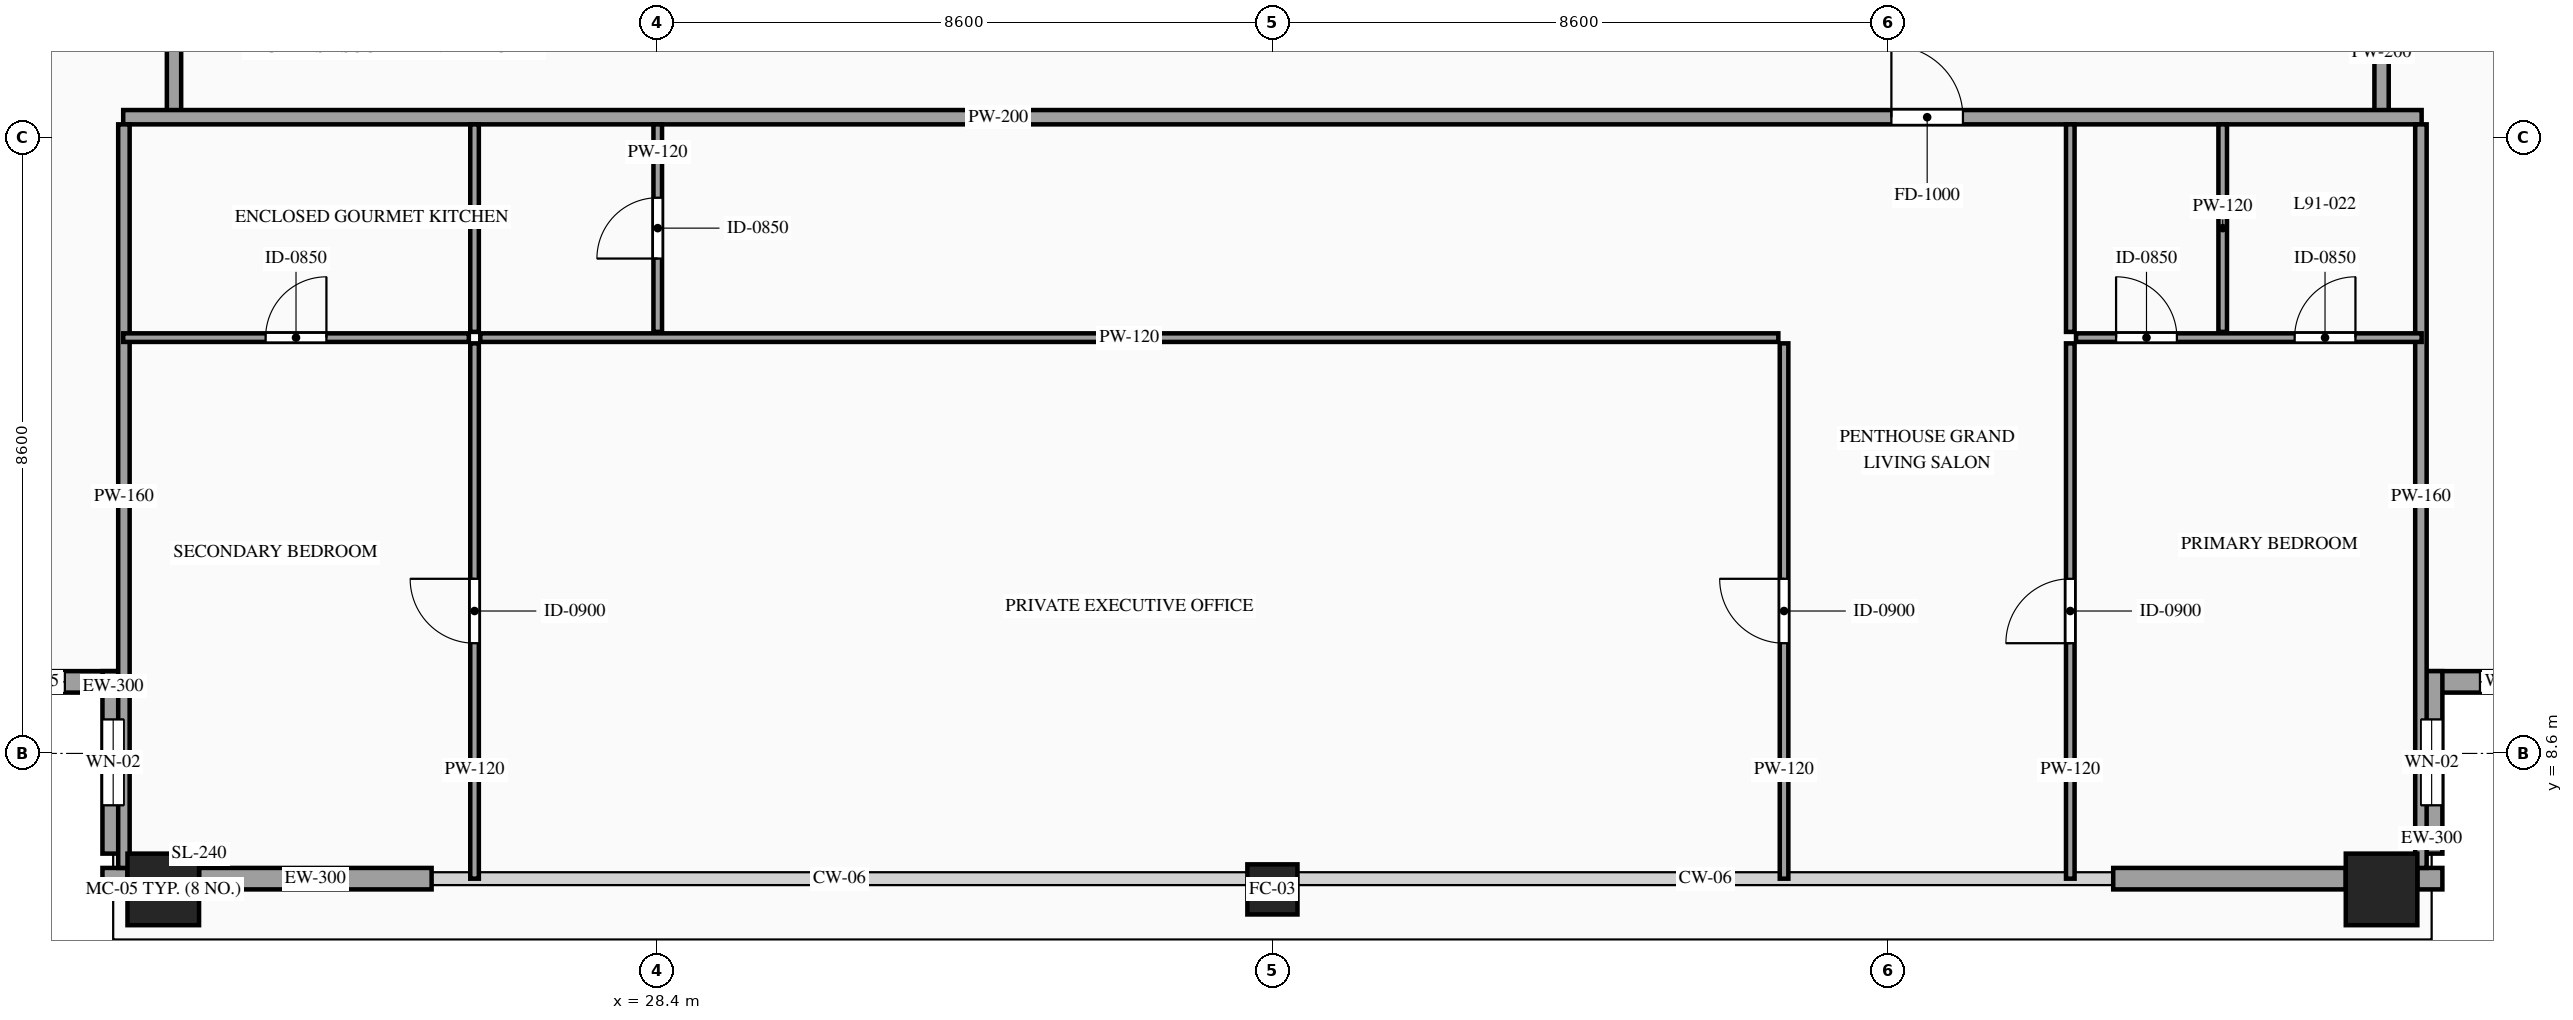
"""IFC4 building model, lengths in metres.
Left out: names, types, materials, properties, quantities, classifications, styles, units other than length and angle.
Written with IfcOpenShell. Run it as: python <this file> out.ifc"""

import sys

from ifc_helpers import new_model, si_unit, direction, frame, frame_2d, origin, origin_2d, place, context, subcontext, project, spatial, rectangle, hollow_rectangle, extrude, source, transform, mapped, element, fill, save


model = new_model("IFC4")
c1 = context("Model", 3, precision=1e-05, world=origin(), true_north=direction((0.0, 1.0)))
c2 = subcontext(c1, "Body", "Model", "MODEL_VIEW")
j1 = project(units=[si_unit("LENGTHUNIT", "METRE"), si_unit("PLANEANGLEUNIT", "RADIAN")], contexts=[c1])
p1 = place(None, origin())
s1 = spatial("IfcSite", under=j1, at=p1, CompositionType="ELEMENT")
p2 = place(p1, origin())
s2 = spatial("IfcBuilding", under=s1, at=p2, CompositionType="ELEMENT")
p3 = place(p2, frame((0.0, 0.0, 339.2)))
s3 = spatial("IfcBuildingStorey", under=s2, at=p3, CompositionType="ELEMENT", Elevation=339.2)
m1 = source(origin(), c2, "Body", "SweptSolid", [
    extrude(hollow_rectangle(XDim=1.0, YDim=1.0, WallThickness=0.048, at=origin_2d()), origin(), (0.0, 0.0, 1.0), 4.0),
])
p4 = place(p3, frame((21.5, 6.7, 0.0), z_axis=(0.0, 0.0, 1.0), x_axis=(1.0, 0.0, 0.0)))
e1 = element("IfcColumn", 1, at=p4, inside=s3, PredefinedType="COLUMN", context=c2, shape_type="MappedRepresentation", body=[
    mapped(m1, transform((0.0, 0.0, 0.0), scale=1.0)),
])
m2 = source(origin(), c2, "Body", "SweptSolid", [
    extrude(hollow_rectangle(XDim=0.7, YDim=0.7, WallThickness=0.032, at=origin_2d()), origin(), (0.0, 0.0, 1.0), 4.0),
])
p5 = place(p3, frame((37.0, 6.7, 0.0), z_axis=(0.0, 0.0, 1.0), x_axis=(1.0, 0.0, 0.0)))
e2 = element("IfcColumn", 2, at=p5, inside=s3, PredefinedType="COLUMN", context=c2, shape_type="MappedRepresentation", body=[
    mapped(m2, transform((0.0, 0.0, 0.0), scale=1.0)),
])
p6 = place(p3, frame((52.5, 6.7, 0.0), z_axis=(0.0, 0.0, 1.0), x_axis=(1.0, 0.0, 0.0)))
e3 = element("IfcColumn", 3, at=p6, inside=s3, PredefinedType="COLUMN", context=c2, shape_type="MappedRepresentation", body=[
    mapped(m1, transform((0.0, 0.0, 0.0), scale=1.0)),
])
p7 = place(p3, frame((18.4, 9.6, 0.0), z_axis=(0.0, 0.0, 1.0), x_axis=(1.0, 0.0, 0.0)))
e4 = element("IfcWall", 4, at=p7, inside=s3, PredefinedType="SOLIDWALL", context=c2, shape_type="SweptSolid", body=[
    extrude(rectangle(XDim=2.55, YDim=0.3, at=frame_2d((1.275, 0.0))), origin(), (0.0, 0.0, 1.0), 3.76),
])
p8 = place(p7, frame((0.825, 0.0, 0.85)))
e5 = element("IfcOpeningElement", 5, at=p8, cuts=e4, PredefinedType="OPENING", context=c2, shape_type="SweptSolid", body=[
    extrude(rectangle(XDim=0.9, YDim=1.5, at=frame_2d((0.45, 0.75))), frame((0.0, 0.165, 0.0), z_axis=(0.0, -1.0, 0.0), x_axis=(1.0, 0.0, 0.0)), (0.0, 0.0, 1.0), 0.33),
])
p9 = place(p3, frame((20.8, 9.75, 0.0), z_axis=(0.0, 0.0, 1.0), x_axis=(0.0, -1.0, 0.0)))
e6 = element("IfcWall", 6, at=p9, inside=s3, PredefinedType="SOLIDWALL", context=c2, shape_type="SweptSolid", body=[
    extrude(rectangle(XDim=2.55, YDim=0.3, at=frame_2d((1.275, 0.0))), origin(), (0.0, 0.0, 1.0), 3.76),
])
p10 = place(p9, frame((0.675, 0.0, 0.85)))
e7 = element("IfcOpeningElement", 7, at=p10, cuts=e6, PredefinedType="OPENING", context=c2, shape_type="SweptSolid", body=[
    extrude(rectangle(XDim=1.2, YDim=2.1, at=frame_2d((0.6, 1.05))), frame((0.0, 0.165, 0.0), z_axis=(0.0, -1.0, 0.0), x_axis=(1.0, 0.0, 0.0)), (0.0, 0.0, 1.0), 0.33),
])
p11 = place(p3, frame((53.05, 9.6, 0.0), z_axis=(0.0, 0.0, 1.0), x_axis=(1.0, 0.0, 0.0)))
e8 = element("IfcWall", 8, at=p11, inside=s3, PredefinedType="SOLIDWALL", context=c2, shape_type="SweptSolid", body=[
    extrude(rectangle(XDim=2.55, YDim=0.3, at=frame_2d((1.275, 0.0))), origin(), (0.0, 0.0, 1.0), 3.76),
])
p12 = place(p11, frame((0.825, 0.0, 0.85)))
e9 = element("IfcOpeningElement", 9, at=p12, cuts=e8, PredefinedType="OPENING", context=c2, shape_type="SweptSolid", body=[
    extrude(rectangle(XDim=0.9, YDim=1.5, at=frame_2d((0.45, 0.75))), frame((0.0, 0.165, 0.0), z_axis=(0.0, -1.0, 0.0), x_axis=(1.0, 0.0, 0.0)), (0.0, 0.0, 1.0), 0.33),
])
p13 = place(p3, frame((53.2, 7.2, 0.0), z_axis=(0.0, 0.0, 1.0), x_axis=(0.0, 1.0, 0.0)))
e10 = element("IfcWall", 10, at=p13, inside=s3, PredefinedType="SOLIDWALL", context=c2, shape_type="SweptSolid", body=[
    extrude(rectangle(XDim=2.55, YDim=0.3, at=frame_2d((1.275, 0.0))), origin(), (0.0, 0.0, 1.0), 3.76),
])
p14 = place(p13, frame((0.675, 0.0, 0.85)))
e11 = element("IfcOpeningElement", 11, at=p14, cuts=e10, PredefinedType="OPENING", context=c2, shape_type="SweptSolid", body=[
    extrude(rectangle(XDim=1.2, YDim=2.1, at=frame_2d((0.6, 1.05))), frame((0.0, 0.165, 0.0), z_axis=(0.0, -1.0, 0.0), x_axis=(1.0, 0.0, 0.0)), (0.0, 0.0, 1.0), 0.33),
])
m3 = source(origin(), c2, "Body", "SweptSolid", [
    extrude(rectangle(XDim=0.35, YDim=0.3, at=frame_2d((0.175, 0.0))), origin(), (0.0, 0.0, 1.0), 3.76),
])
for number, where, z_axis, x_axis in (
    (12, (20.65, 6.85, 0.0), (0.0, 0.0, 1.0), (1.0, 0.0, 0.0)),
    (13, (53.0, 6.85, 0.0), (0.0, 0.0, 1.0), (1.0, 0.0, 0.0)),
):
    element("IfcWall", number, at=place(p3, frame(where, z_axis=z_axis, x_axis=x_axis)), inside=s3, PredefinedType="SOLIDWALL", context=c2, shape_type="MappedRepresentation", body=[
        mapped(m3, transform((0.0, 0.0, 0.0), scale=1.0)),
    ])
m4 = source(origin(), c2, "Body", "SweptSolid", [
    extrude(rectangle(XDim=3.25, YDim=0.3, at=frame_2d((1.625, 0.0))), origin(), (0.0, 0.0, 1.0), 3.365),
])
for number, where, z_axis, x_axis in (
    (14, (22.0, 6.85, 0.0), (0.0, 0.0, 1.0), (1.0, 0.0, 0.0)),
    (15, (48.75, 6.85, 0.0), (0.0, 0.0, 1.0), (1.0, 0.0, 0.0)),
):
    element("IfcWall", number, at=place(p3, frame(where, z_axis=z_axis, x_axis=x_axis)), inside=s3, PredefinedType="SOLIDWALL", context=c2, shape_type="MappedRepresentation", body=[
        mapped(m4, transform((0.0, 0.0, 0.0), scale=1.0)),
    ])
m5 = source(origin(), c2, "Body", "SweptSolid", [
    extrude(rectangle(XDim=1.7, YDim=0.2, at=frame_2d((0.85, 0.0))), origin(), (0.0, 0.0, 1.0), 3.76),
])
for number, where, z_axis, x_axis in (
    (16, (21.65, 17.55, 0.0), (0.0, 0.0, 1.0), (0.0, 1.0, 0.0)),
    (17, (52.5, 17.55, 0.0), (0.0, 0.0, 1.0), (0.0, 1.0, 0.0)),
):
    element("IfcWall", number, at=place(p3, frame(where, z_axis=z_axis, x_axis=x_axis)), inside=s3, PredefinedType="PARTITIONING", context=c2, shape_type="MappedRepresentation", body=[
        mapped(m5, transform((0.0, 0.0, 0.0), scale=1.0)),
    ])
p15 = place(p3, frame((20.94, 17.49, 0.0), z_axis=(0.0, 0.0, 1.0), x_axis=(1.0, 0.0, 0.0)))
e18 = element("IfcWall", 18, at=p15, inside=s3, PredefinedType="PARTITIONING", context=c2, shape_type="SweptSolid", body=[
    extrude(rectangle(XDim=32.12, YDim=0.2, at=frame_2d((16.06, 0.0))), origin(), (0.0, 0.0, 1.0), 3.76),
])
p16 = place(p15, frame((24.71, 0.0, 0.0)))
e19 = element("IfcOpeningElement", 19, at=p16, cuts=e18, PredefinedType="OPENING", context=c2, shape_type="SweptSolid", body=[
    extrude(rectangle(XDim=1.0, YDim=2.2, at=frame_2d((0.5, 1.1))), frame((0.0, 0.115, 0.0), z_axis=(0.0, -1.0, 0.0), x_axis=(1.0, 0.0, 0.0)), (0.0, 0.0, 1.0), 0.23),
])
m6 = source(origin(), c2, "Body", "SweptSolid", [
    extrude(rectangle(XDim=10.39, YDim=0.16, at=frame_2d((5.195, 0.0))), origin(), (0.0, 0.0, 1.0), 3.76),
])
for number, where, z_axis, x_axis in (
    (20, (20.95, 7.0, 0.0), (0.0, 0.0, 1.0), (0.0, 1.0, 0.0)),
    (21, (53.05, 7.0, 0.0), (0.0, 0.0, 1.0), (0.0, 1.0, 0.0)),
):
    element("IfcWall", number, at=place(p3, frame(where, z_axis=z_axis, x_axis=x_axis)), inside=s3, PredefinedType="PARTITIONING", context=c2, shape_type="MappedRepresentation", body=[
        mapped(m6, transform((0.0, 0.0, 0.0), scale=1.0)),
    ])
p17 = place(p3, frame((20.94, 14.41, 0.0), z_axis=(0.0, 0.0, 1.0), x_axis=(1.0, 0.0, 0.0)))
e22 = element("IfcWall", 22, at=p17, inside=s3, PredefinedType="PARTITIONING", context=c2, shape_type="SweptSolid", body=[
    extrude(rectangle(XDim=4.83, YDim=0.12, at=frame_2d((2.415, 0.0))), origin(), (0.0, 0.0, 1.0), 3.76),
])
p18 = place(p17, frame((1.99, 0.0, 0.0)))
e23 = element("IfcOpeningElement", 23, at=p18, cuts=e22, PredefinedType="OPENING", context=c2, shape_type="SweptSolid", body=[
    extrude(rectangle(XDim=0.85, YDim=2.1, at=frame_2d((0.425, 1.05))), frame((0.0, 0.075, 0.0), z_axis=(0.0, -1.0, 0.0), x_axis=(1.0, 0.0, 0.0)), (0.0, 0.0, 1.0), 0.15),
])
m7 = source(origin(), c2, "Body", "SweptSolid", [
    extrude(rectangle(XDim=2.9, YDim=0.12, at=frame_2d((1.45, 0.0))), origin(), (0.0, 0.0, 1.0), 3.76),
])
p19 = place(p3, frame((25.85, 14.49, 0.0), z_axis=(0.0, 0.0, 1.0), x_axis=(0.0, 1.0, 0.0)))
e24 = element("IfcWall", 24, at=p19, inside=s3, PredefinedType="PARTITIONING", context=c2, shape_type="MappedRepresentation", body=[
    mapped(m7, transform((0.0, 0.0, 0.0), scale=1.0)),
])
p20 = place(p3, frame((28.41, 14.49, 0.0), z_axis=(0.0, 0.0, 1.0), x_axis=(0.0, 1.0, 0.0)))
e25 = element("IfcWall", 25, at=p20, inside=s3, PredefinedType="PARTITIONING", context=c2, shape_type="SweptSolid", body=[
    extrude(rectangle(XDim=2.9, YDim=0.12, at=frame_2d((1.45, 0.0))), origin(), (0.0, 0.0, 1.0), 3.76),
])
p21 = place(p20, frame((1.025, 0.0, 0.0)))
e26 = element("IfcOpeningElement", 26, at=p21, cuts=e25, PredefinedType="OPENING", context=c2, shape_type="SweptSolid", body=[
    extrude(rectangle(XDim=0.85, YDim=2.1, at=frame_2d((0.425, 1.05))), frame((0.0, 0.075, 0.0), z_axis=(0.0, -1.0, 0.0), x_axis=(1.0, 0.0, 0.0)), (0.0, 0.0, 1.0), 0.15),
])
m8 = source(origin(), c2, "Body", "SweptSolid", [
    extrude(rectangle(XDim=2.9, YDim=0.12, at=frame_2d((1.45, 0.0))), origin(), (0.0, 0.0, 1.0), 3.305),
])
p22 = place(p3, frame((50.28, 14.49, 0.0), z_axis=(0.0, 0.0, 1.0), x_axis=(0.0, 1.0, 0.0)))
e27 = element("IfcWall", 27, at=p22, inside=s3, PredefinedType="PARTITIONING", context=c2, shape_type="MappedRepresentation", body=[
    mapped(m8, transform((0.0, 0.0, 0.0), scale=1.0)),
])
p23 = place(p3, frame((48.15, 14.49, 0.0), z_axis=(0.0, 0.0, 1.0), x_axis=(0.0, 1.0, 0.0)))
e28 = element("IfcWall", 28, at=p23, inside=s3, PredefinedType="PARTITIONING", context=c2, shape_type="MappedRepresentation", body=[
    mapped(m7, transform((0.0, 0.0, 0.0), scale=1.0)),
])
p24 = place(p3, frame((25.85, 6.85, 0.0), z_axis=(0.0, 0.0, 1.0), x_axis=(0.0, 1.0, 0.0)))
e29 = element("IfcWall", 29, at=p24, inside=s3, PredefinedType="PARTITIONING", context=c2, shape_type="SweptSolid", body=[
    extrude(rectangle(XDim=7.48, YDim=0.12, at=frame_2d((3.74, 0.0))), origin(), (0.0, 0.0, 1.0), 3.76),
])
p25 = place(p24, frame((3.29, 0.0, 0.0)))
e30 = element("IfcOpeningElement", 30, at=p25, cuts=e29, PredefinedType="OPENING", context=c2, shape_type="SweptSolid", body=[
    extrude(rectangle(XDim=0.9, YDim=2.15, at=frame_2d((0.45, 1.075))), frame((0.0, 0.075, 0.0), z_axis=(0.0, -1.0, 0.0), x_axis=(1.0, 0.0, 0.0)), (0.0, 0.0, 1.0), 0.15),
])
p26 = place(p3, frame((48.23, 14.41, 0.0), z_axis=(0.0, 0.0, 1.0), x_axis=(1.0, 0.0, 0.0)))
e31 = element("IfcWall", 31, at=p26, inside=s3, PredefinedType="PARTITIONING", context=c2, shape_type="SweptSolid", body=[
    extrude(rectangle(XDim=4.83, YDim=0.12, at=frame_2d((2.415, 0.0))), origin(), (0.0, 0.0, 1.0), 3.76),
])
p27 = place(p26, frame((3.055, 0.0, 0.0)))
e32 = element("IfcOpeningElement", 32, at=p27, cuts=e31, PredefinedType="OPENING", context=c2, shape_type="SweptSolid", body=[
    extrude(rectangle(XDim=0.85, YDim=2.1, at=frame_2d((0.425, 1.05))), frame((0.0, 0.075, 0.0), z_axis=(0.0, -1.0, 0.0), x_axis=(1.0, 0.0, 0.0)), (0.0, 0.0, 1.0), 0.15),
])
p28 = place(p26, frame((0.56, 0.0, 0.0)))
e33 = element("IfcOpeningElement", 33, at=p28, cuts=e31, PredefinedType="OPENING", context=c2, shape_type="SweptSolid", body=[
    extrude(rectangle(XDim=0.85, YDim=2.1, at=frame_2d((0.425, 1.05))), frame((0.0, 0.075, 0.0), z_axis=(0.0, -1.0, 0.0), x_axis=(1.0, 0.0, 0.0)), (0.0, 0.0, 1.0), 0.15),
])
p29 = place(p3, frame((48.15, 6.85, 0.0), z_axis=(0.0, 0.0, 1.0), x_axis=(0.0, 1.0, 0.0)))
e34 = element("IfcWall", 34, at=p29, inside=s3, PredefinedType="PARTITIONING", context=c2, shape_type="SweptSolid", body=[
    extrude(rectangle(XDim=7.48, YDim=0.12, at=frame_2d((3.74, 0.0))), origin(), (0.0, 0.0, 1.0), 3.76),
])
p30 = place(p29, frame((3.29, 0.0, 0.0)))
e35 = element("IfcOpeningElement", 35, at=p30, cuts=e34, PredefinedType="OPENING", context=c2, shape_type="SweptSolid", body=[
    extrude(rectangle(XDim=0.9, YDim=2.15, at=frame_2d((0.45, 1.075))), frame((0.0, 0.075, 0.0), z_axis=(0.0, -1.0, 0.0), x_axis=(1.0, 0.0, 0.0)), (0.0, 0.0, 1.0), 0.15),
])
m9 = source(origin(), c2, "Body", "SweptSolid", [
    extrude(rectangle(XDim=18.14, YDim=0.12, at=frame_2d((9.07, 0.0))), origin(), (0.0, 0.0, 1.0), 3.76),
])
p31 = place(p3, frame((25.93, 14.41, 0.0), z_axis=(0.0, 0.0, 1.0), x_axis=(1.0, 0.0, 0.0)))
e36 = element("IfcWall", 36, at=p31, inside=s3, PredefinedType="PARTITIONING", context=c2, shape_type="MappedRepresentation", body=[
    mapped(m9, transform((0.0, 0.0, 0.0), scale=1.0)),
])
p32 = place(p3, frame((44.15, 6.85, 0.0), z_axis=(0.0, 0.0, 1.0), x_axis=(0.0, 1.0, 0.0)))
e37 = element("IfcWall", 37, at=p32, inside=s3, PredefinedType="PARTITIONING", context=c2, shape_type="SweptSolid", body=[
    extrude(rectangle(XDim=7.48, YDim=0.12, at=frame_2d((3.74, 0.0))), origin(), (0.0, 0.0, 1.0), 3.76),
])
p33 = place(p32, frame((3.29, 0.0, 0.0)))
e38 = element("IfcOpeningElement", 38, at=p33, cuts=e37, PredefinedType="OPENING", context=c2, shape_type="SweptSolid", body=[
    extrude(rectangle(XDim=0.9, YDim=2.15, at=frame_2d((0.45, 1.075))), frame((0.0, 0.075, 0.0), z_axis=(0.0, -1.0, 0.0), x_axis=(1.0, 0.0, 0.0)), (0.0, 0.0, 1.0), 0.15),
])
m10 = source(origin(), c2, "Body", "SweptSolid", [
    extrude(rectangle(XDim=0.9, YDim=1.5, at=frame_2d((0.45, 0.75))), frame((0.0, 0.03, 0.0), z_axis=(0.0, -1.0, 0.0), x_axis=(1.0, 0.0, 0.0)), (0.0, 0.0, 1.0), 0.06),
])
p34 = place(p8, origin())
e39 = element("IfcWindow", 39, at=p34, inside=s3, PartitioningType="SINGLE_PANEL", PredefinedType="WINDOW", context=c2, shape_type="MappedRepresentation", body=[
    mapped(m10, transform((0.0, 0.0, 0.0), scale=1.0)),
])
fill(e5, e39)
m11 = source(origin(), c2, "Body", "SweptSolid", [
    extrude(rectangle(XDim=1.2, YDim=2.1, at=frame_2d((0.6, 1.05))), frame((0.0, 0.03, 0.0), z_axis=(0.0, -1.0, 0.0), x_axis=(1.0, 0.0, 0.0)), (0.0, 0.0, 1.0), 0.06),
])
p35 = place(p10, origin())
e40 = element("IfcWindow", 40, at=p35, inside=s3, PartitioningType="SINGLE_PANEL", PredefinedType="WINDOW", context=c2, shape_type="MappedRepresentation", body=[
    mapped(m11, transform((0.0, 0.0, 0.0), scale=1.0)),
])
fill(e7, e40)
p36 = place(p12, origin())
e41 = element("IfcWindow", 41, at=p36, inside=s3, PartitioningType="SINGLE_PANEL", PredefinedType="WINDOW", context=c2, shape_type="MappedRepresentation", body=[
    mapped(m10, transform((0.0, 0.0, 0.0), scale=1.0)),
])
fill(e9, e41)
p37 = place(p14, origin())
e42 = element("IfcWindow", 42, at=p37, inside=s3, PartitioningType="SINGLE_PANEL", PredefinedType="WINDOW", context=c2, shape_type="MappedRepresentation", body=[
    mapped(m11, transform((0.0, 0.0, 0.0), scale=1.0)),
])
fill(e11, e42)
m12 = source(origin(), c2, "Body", "SweptSolid", [
    extrude(rectangle(XDim=1.0, YDim=2.2, at=frame_2d((0.5, 1.1))), frame((0.0, 0.025, 0.0), z_axis=(0.0, -1.0, 0.0), x_axis=(1.0, 0.0, 0.0)), (0.0, 0.0, 1.0), 0.05),
])
p38 = place(p16, origin())
e43 = element("IfcDoor", 43, at=p38, inside=s3, OperationType="SINGLE_SWING_LEFT", PredefinedType="DOOR", context=c2, shape_type="MappedRepresentation", body=[
    mapped(m12, transform((0.0, 0.0, 0.0), scale=1.0)),
])
fill(e19, e43)
m13 = source(origin(), c2, "Body", "SweptSolid", [
    extrude(rectangle(XDim=0.85, YDim=2.1, at=frame_2d((0.425, 1.05))), frame((0.0, 0.025, 0.0), z_axis=(0.0, -1.0, 0.0), x_axis=(1.0, 0.0, 0.0)), (0.0, 0.0, 1.0), 0.05),
])
p39 = place(p18, origin())
e44 = element("IfcDoor", 44, at=p39, inside=s3, OperationType="SINGLE_SWING_RIGHT", PredefinedType="DOOR", context=c2, shape_type="MappedRepresentation", body=[
    mapped(m13, transform((0.0, 0.0, 0.0), scale=1.0)),
])
fill(e23, e44)
p40 = place(p21, origin())
e45 = element("IfcDoor", 45, at=p40, inside=s3, OperationType="SINGLE_SWING_LEFT", PredefinedType="DOOR", context=c2, shape_type="MappedRepresentation", body=[
    mapped(m13, transform((0.0, 0.0, 0.0), scale=1.0)),
])
fill(e26, e45)
p41 = place(p27, origin())
e46 = element("IfcDoor", 46, at=p41, inside=s3, OperationType="SINGLE_SWING_RIGHT", PredefinedType="DOOR", context=c2, shape_type="MappedRepresentation", body=[
    mapped(m13, transform((0.0, 0.0, 0.0), scale=1.0)),
])
fill(e32, e46)
p42 = place(p28, origin())
e47 = element("IfcDoor", 47, at=p42, inside=s3, OperationType="SINGLE_SWING_LEFT", PredefinedType="DOOR", context=c2, shape_type="MappedRepresentation", body=[
    mapped(m13, transform((0.0, 0.0, 0.0), scale=1.0)),
])
fill(e33, e47)
m14 = source(origin(), c2, "Body", "SweptSolid", [
    extrude(rectangle(XDim=0.9, YDim=2.15, at=frame_2d((0.45, 1.075))), frame((0.0, 0.025, 0.0), z_axis=(0.0, -1.0, 0.0), x_axis=(1.0, 0.0, 0.0)), (0.0, 0.0, 1.0), 0.05),
])
p43 = place(p25, origin())
e48 = element("IfcDoor", 48, at=p43, inside=s3, OperationType="SINGLE_SWING_RIGHT", PredefinedType="DOOR", context=c2, shape_type="MappedRepresentation", body=[
    mapped(m14, transform((0.0, 0.0, 0.0), scale=1.0)),
])
fill(e30, e48)
p44 = place(p30, origin())
e49 = element("IfcDoor", 49, at=p44, inside=s3, OperationType="SINGLE_SWING_LEFT", PredefinedType="DOOR", context=c2, shape_type="MappedRepresentation", body=[
    mapped(m14, transform((0.0, 0.0, 0.0), scale=1.0)),
])
fill(e35, e49)
p45 = place(p33, origin())
e50 = element("IfcDoor", 50, at=p45, inside=s3, OperationType="SINGLE_SWING_RIGHT", PredefinedType="DOOR", context=c2, shape_type="MappedRepresentation", body=[
    mapped(m14, transform((0.0, 0.0, 0.0), scale=1.0)),
])
fill(e38, e50)
save(model, sys.argv[1])
